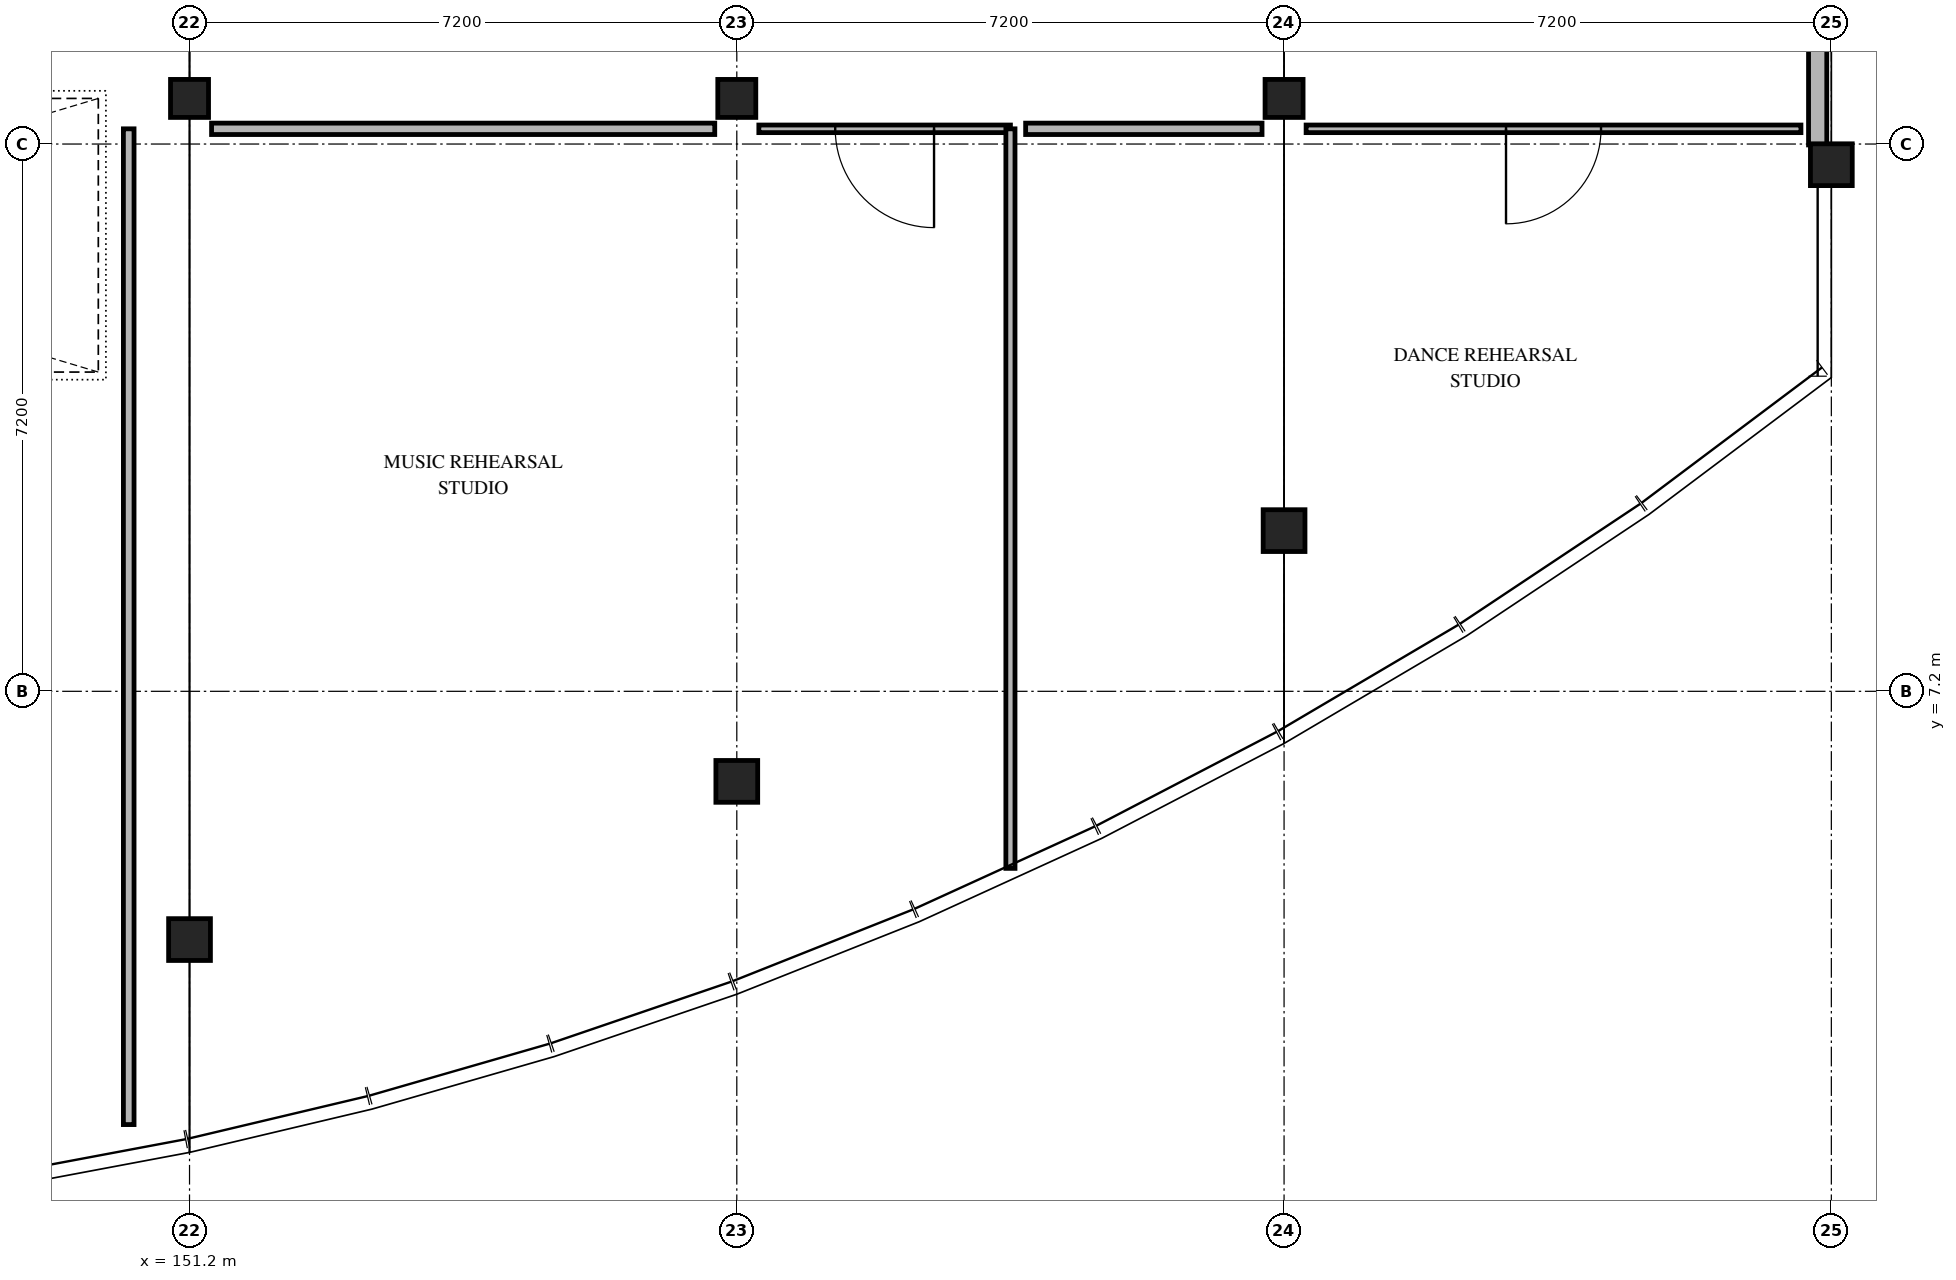
"""IFC4 building model, lengths in metres.
Left out: names, types, materials, properties, quantities, classifications, styles, units other than length and angle.
Written with IfcOpenShell. Run it as: python <this file> out.ifc"""

import sys

from ifc_helpers import new_model, si_unit, direction, frame, frame_2d, origin, origin_2d, place, context, subcontext, project, spatial, rectangle, extrude, element, fill, save


model = new_model("IFC4")
c1 = context("Model", 3, precision=1e-05, world=origin(), true_north=direction((0.0, 1.0)))
c2 = subcontext(c1, "Body", "Model", "MODEL_VIEW")
j1 = project(units=[si_unit("LENGTHUNIT", "METRE"), si_unit("PLANEANGLEUNIT", "RADIAN")], contexts=[c1])
p1 = place(None, origin())
s1 = spatial("IfcSite", under=j1, at=p1, CompositionType="ELEMENT")
p2 = place(p1, origin())
s2 = spatial("IfcBuilding", under=s1, at=p2, CompositionType="ELEMENT")
p3 = place(p2, frame((0.0, 0.0, 8.7)))
s3 = spatial("IfcBuildingStorey", under=s2, at=p3, CompositionType="ELEMENT", Elevation=8.7)
p4 = place(p3, frame((151.2, 3.934, 0.0), z_axis=(0.0, 0.0, 1.0), x_axis=(1.0, 0.0, 0.0)))
e1 = element("IfcColumn", 1, at=p4, inside=s3, PredefinedType="COLUMN", context=c2, shape_type="SweptSolid", body=[
    extrude(rectangle(XDim=0.55, YDim=0.55, at=origin_2d()), origin(), (0.0, 0.0, 1.0), 4.2),
])
p5 = place(p3, frame((151.2, 15.0, 0.0), z_axis=(0.0, 0.0, 1.0), x_axis=(1.0, 0.0, 0.0)))
e2 = element("IfcColumn", 2, at=p5, inside=s3, PredefinedType="COLUMN", context=c2, shape_type="SweptSolid", body=[
    extrude(rectangle(XDim=0.5, YDim=0.5, at=origin_2d()), origin(), (0.0, 0.0, 1.0), 4.2),
])
p6 = place(p3, frame((158.4, 6.015, 0.0), z_axis=(0.0, 0.0, 1.0), x_axis=(1.0, 0.0, 0.0)))
e3 = element("IfcColumn", 3, at=p6, inside=s3, PredefinedType="COLUMN", context=c2, shape_type="SweptSolid", body=[
    extrude(rectangle(XDim=0.55, YDim=0.55, at=origin_2d()), origin(), (0.0, 0.0, 1.0), 4.2),
])
p7 = place(p3, frame((158.4, 15.0, 0.0), z_axis=(0.0, 0.0, 1.0), x_axis=(1.0, 0.0, 0.0)))
e4 = element("IfcColumn", 4, at=p7, inside=s3, PredefinedType="COLUMN", context=c2, shape_type="SweptSolid", body=[
    extrude(rectangle(XDim=0.5, YDim=0.5, at=origin_2d()), origin(), (0.0, 0.0, 1.0), 4.2),
])
p8 = place(p3, frame((165.6, 9.314, 0.0), z_axis=(0.0, 0.0, 1.0), x_axis=(1.0, 0.0, 0.0)))
e5 = element("IfcColumn", 5, at=p8, inside=s3, PredefinedType="COLUMN", context=c2, shape_type="SweptSolid", body=[
    extrude(rectangle(XDim=0.55, YDim=0.55, at=origin_2d()), origin(), (0.0, 0.0, 1.0), 4.2),
])
p9 = place(p3, frame((165.6, 15.0, 0.0), z_axis=(0.0, 0.0, 1.0), x_axis=(1.0, 0.0, 0.0)))
e6 = element("IfcColumn", 6, at=p9, inside=s3, PredefinedType="COLUMN", context=c2, shape_type="SweptSolid", body=[
    extrude(rectangle(XDim=0.5, YDim=0.5, at=origin_2d()), origin(), (0.0, 0.0, 1.0), 4.2),
])
p10 = place(p3, frame((172.8, 14.128, 0.0), z_axis=(0.0, 0.0, 1.0), x_axis=(1.0, 0.0, 0.0)))
e7 = element("IfcColumn", 7, at=p10, inside=s3, PredefinedType="COLUMN", context=c2, shape_type="SweptSolid", body=[
    extrude(rectangle(XDim=0.55, YDim=0.55, at=origin_2d()), origin(), (0.0, 0.0, 1.0), 4.2),
])
p11 = place(p3, frame((172.62, 22.165, 0.0), z_axis=(0.0, 0.0, 1.0), x_axis=(0.0, -1.0, 0.0)))
e8 = element("IfcWall", 8, at=p11, inside=s3, PredefinedType="SOLIDWALL", context=c2, shape_type="SweptSolid", body=[
    extrude(rectangle(XDim=7.777, YDim=0.24, at=frame_2d((3.889, 0.0))), origin(), (0.0, 0.0, 1.0), 3.21),
])
p12 = place(p11, frame((2.838, 0.0, 0.9)))
e9 = element("IfcOpeningElement", 9, at=p12, cuts=e8, PredefinedType="OPENING", context=c2, shape_type="SweptSolid", body=[
    extrude(rectangle(XDim=2.1, YDim=1.2, at=frame_2d((1.05, 0.6))), frame((0.0, 0.13, 0.0), z_axis=(0.0, -1.0, 0.0), x_axis=(1.0, 0.0, 0.0)), (0.0, 0.0, 1.0), 0.26),
])
p13 = place(p3, frame((162.0, 14.6, 0.0), z_axis=(0.0, 0.0, 1.0), x_axis=(-1.0, 0.0, 0.0)))
e10 = element("IfcWall", 10, at=p13, inside=s3, PredefinedType="PARTITIONING", context=c2, shape_type="SweptSolid", body=[
    extrude(rectangle(XDim=3.31, YDim=0.1, at=frame_2d((1.655, 0.0))), origin(), (0.0, 0.0, 1.0), 3.96),
])
p14 = place(p13, frame((1.005, 0.0, 0.0)))
e11 = element("IfcOpeningElement", 11, at=p14, cuts=e10, PredefinedType="OPENING", context=c2, shape_type="SweptSolid", body=[
    extrude(rectangle(XDim=1.3, YDim=2.2, at=frame_2d((0.65, 1.1))), frame((0.0, 0.06, 0.0), z_axis=(0.0, -1.0, 0.0), x_axis=(1.0, 0.0, 0.0)), (0.0, 0.0, 1.0), 0.12),
])
p15 = place(p3, frame((158.11, 14.6, 0.0), z_axis=(0.0, 0.0, 1.0), x_axis=(-1.0, 0.0, 0.0)))
e12 = element("IfcWall", 12, at=p15, inside=s3, PredefinedType="PARTITIONING", context=c2, shape_type="SweptSolid", body=[
    extrude(rectangle(XDim=6.62, YDim=0.15, at=frame_2d((3.31, 0.0))), origin(), (0.0, 0.0, 1.0), 3.96),
])
p16 = place(p3, frame((150.4, 14.6, 0.0), z_axis=(0.0, 0.0, 1.0), x_axis=(0.0, -1.0, 0.0)))
e13 = element("IfcWall", 13, at=p16, inside=s3, PredefinedType="PARTITIONING", context=c2, shape_type="SweptSolid", body=[
    extrude(rectangle(XDim=13.1, YDim=0.14, at=frame_2d((6.55, 0.0))), origin(), (0.0, 0.0, 1.0), 3.36),
])
p17 = place(p3, frame((162.0, 4.871, 0.0), z_axis=(0.0, 0.0, 1.0), x_axis=(0.0, 1.0, 0.0)))
e14 = element("IfcWall", 14, at=p17, inside=s3, PredefinedType="PARTITIONING", context=c2, shape_type="SweptSolid", body=[
    extrude(rectangle(XDim=9.729, YDim=0.12, at=frame_2d((4.865, 0.0))), origin(), (0.0, 0.0, 1.0), 3.36),
])
p18 = place(p3, frame((172.4, 14.6, 0.0), z_axis=(0.0, 0.0, 1.0), x_axis=(-1.0, 0.0, 0.0)))
e15 = element("IfcWall", 15, at=p18, inside=s3, PredefinedType="PARTITIONING", context=c2, shape_type="SweptSolid", body=[
    extrude(rectangle(XDim=6.51, YDim=0.1, at=frame_2d((3.255, 0.0))), origin(), (0.0, 0.0, 1.0), 3.96),
])
p19 = place(p18, frame((2.63, 0.0, 0.0)))
e16 = element("IfcOpeningElement", 16, at=p19, cuts=e15, PredefinedType="OPENING", context=c2, shape_type="SweptSolid", body=[
    extrude(rectangle(XDim=1.25, YDim=2.2, at=frame_2d((0.625, 1.1))), frame((0.0, 0.06, 0.0), z_axis=(0.0, -1.0, 0.0), x_axis=(1.0, 0.0, 0.0)), (0.0, 0.0, 1.0), 0.12),
])
p20 = place(p3, frame((165.31, 14.6, 0.0), z_axis=(0.0, 0.0, 1.0), x_axis=(-1.0, 0.0, 0.0)))
e17 = element("IfcWall", 17, at=p20, inside=s3, PredefinedType="PARTITIONING", context=c2, shape_type="SweptSolid", body=[
    extrude(rectangle(XDim=3.11, YDim=0.15, at=frame_2d((1.555, 0.0))), origin(), (0.0, 0.0, 1.0), 3.96),
])
p21 = place(p14, origin())
e18 = element("IfcDoor", 18, at=p21, inside=s3, OperationType="SINGLE_SWING_LEFT", PredefinedType="DOOR", context=c2, shape_type="SweptSolid", body=[
    extrude(rectangle(XDim=1.3, YDim=2.2, at=frame_2d((0.65, 1.1))), frame((0.0, 0.025, 0.0), z_axis=(0.0, -1.0, 0.0), x_axis=(1.0, 0.0, 0.0)), (0.0, 0.0, 1.0), 0.05),
])
fill(e11, e18)
p22 = place(p19, origin())
e19 = element("IfcDoor", 19, at=p22, inside=s3, OperationType="SINGLE_SWING_RIGHT", PredefinedType="DOOR", context=c2, shape_type="SweptSolid", body=[
    extrude(rectangle(XDim=1.25, YDim=2.2, at=frame_2d((0.625, 1.1))), frame((0.0, 0.025, 0.0), z_axis=(0.0, -1.0, 0.0), x_axis=(1.0, 0.0, 0.0)), (0.0, 0.0, 1.0), 0.05),
])
fill(e16, e19)
save(model, sys.argv[1])
